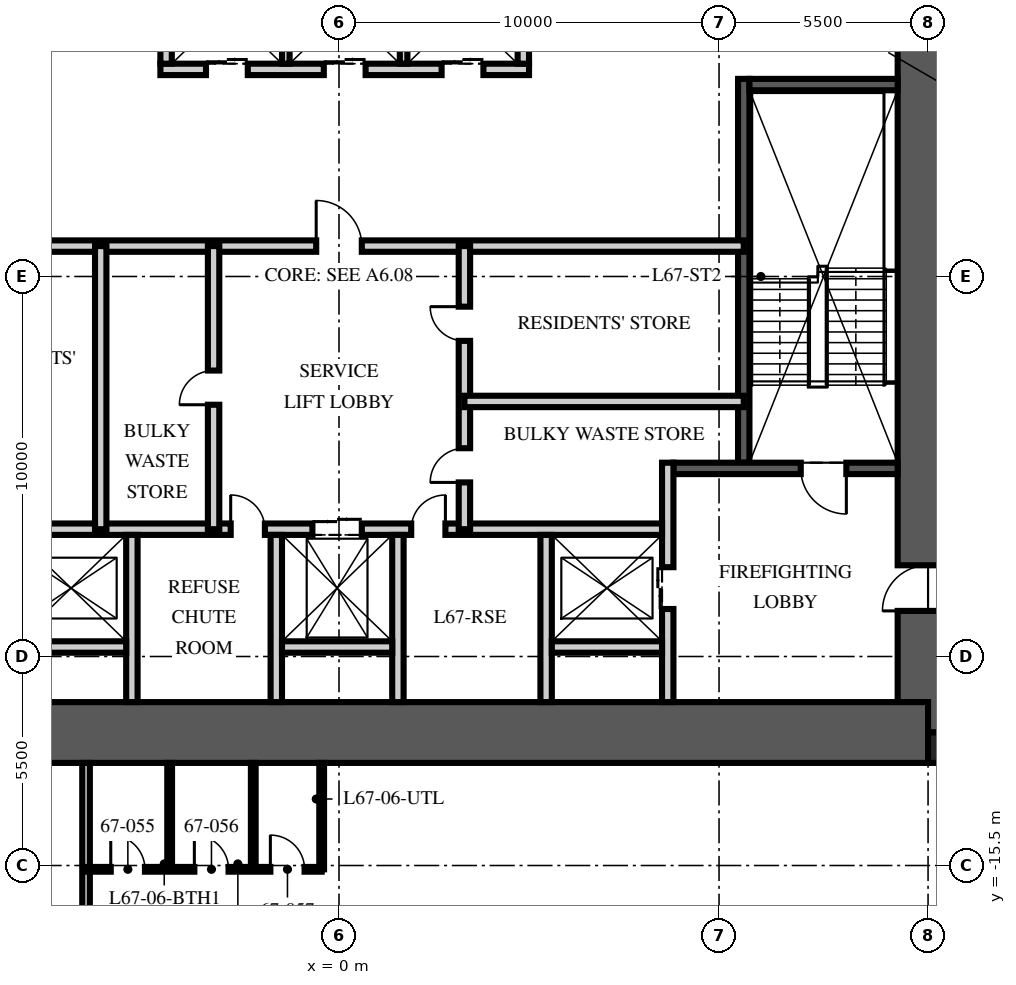
"""IFC4 building model, lengths in metres.
Left out: names, types, materials, properties, quantities, classifications, styles, units other than length and angle.
Written with IfcOpenShell. Run it as: python <this file> out.ifc"""

import sys

from ifc_helpers import new_model, si_unit, direction, frame, frame_2d, origin, origin_2d, place, context, subcontext, project, spatial, rectangle, extrude, element, fill, save


model = new_model("IFC4")
c1 = context("Model", 3, precision=1e-05, world=origin(), true_north=direction((0.0, 1.0)))
c2 = subcontext(c1, "Body", "Model", "MODEL_VIEW")
j1 = project(units=[si_unit("LENGTHUNIT", "METRE"), si_unit("PLANEANGLEUNIT", "RADIAN")], contexts=[c1])
p1 = place(None, origin())
s1 = spatial("IfcSite", under=j1, at=p1, CompositionType="ELEMENT")
p2 = place(p1, origin())
s2 = spatial("IfcBuilding", under=s1, at=p2, CompositionType="ELEMENT")
p3 = place(p2, frame((0.0, 0.0, 267.0)))
s3 = spatial("IfcBuildingStorey", under=s2, at=p3, CompositionType="ELEMENT", Elevation=267.0)
p4 = place(p3, frame((15.5, -12.0, -0.25), z_axis=(0.0, 0.0, 1.0), x_axis=(0.0, 1.0, 0.0)))
e1 = element("IfcWall", 1, at=p4, inside=s3, PredefinedType="SHEAR", context=c2, shape_type="SweptSolid", body=[
    extrude(rectangle(XDim=24.0, YDim=1.6, at=frame_2d((12.0, 0.0))), origin(), (0.0, 0.0, 1.0), 3.75),
])
p5 = place(p4, frame((3.2, 0.0, 0.25)))
e2 = element("IfcOpeningElement", 2, at=p5, cuts=e1, PredefinedType="OPENING", context=c2, shape_type="SweptSolid", body=[
    extrude(rectangle(XDim=1.2, YDim=2.1, at=frame_2d((0.6, 1.05))), frame((0.0, 0.81, 0.0), z_axis=(0.0, -1.0, 0.0), x_axis=(1.0, 0.0, 0.0)), (0.0, 0.0, 1.0), 1.62),
])
p6 = place(p4, frame((19.3, 0.0, 0.25)))
e3 = element("IfcOpeningElement", 3, at=p6, cuts=e1, PredefinedType="OPENING", context=c2, shape_type="SweptSolid", body=[
    extrude(rectangle(XDim=1.8, YDim=2.1, at=frame_2d((0.9, 1.05))), frame((0.0, 0.81, 0.0), z_axis=(0.0, -1.0, 0.0), x_axis=(1.0, 0.0, 0.0)), (0.0, 0.0, 1.0), 1.62),
])
p7 = place(p3, frame((-15.5, -12.0, -0.25), z_axis=(0.0, 0.0, 1.0), x_axis=(1.0, 0.0, 0.0)))
e4 = element("IfcWall", 4, at=p7, inside=s3, PredefinedType="SHEAR", context=c2, shape_type="SweptSolid", body=[
    extrude(rectangle(XDim=31.0, YDim=1.6, at=frame_2d((15.5, 0.0))), origin(), (0.0, 0.0, 1.0), 3.75),
])
p8 = place(p3, frame((15.9, -12.4, -0.25), z_axis=(0.0, 0.0, 1.0), x_axis=(1.0, 0.0, 0.0)))
e5 = element("IfcColumn", 5, at=p8, inside=s3, PredefinedType="COLUMN", context=c2, shape_type="SweptSolid", body=[
    extrude(rectangle(XDim=0.8, YDim=0.8, at=origin_2d()), origin(), (0.0, 0.0, 1.0), 3.75),
])
p9 = place(p3, frame((10.65, -4.9, 0.0), z_axis=(0.0, 0.0, 1.0), x_axis=(0.0, 1.0, 0.0)))
e6 = element("IfcWall", 6, at=p9, inside=s3, PredefinedType="SOLIDWALL", context=c2, shape_type="SweptSolid", body=[
    extrude(rectangle(XDim=10.1, YDim=0.3, at=frame_2d((5.05, 0.0))), origin(), (0.0, 0.0, 1.0), 3.5),
])
p10 = place(p3, frame((14.7, -5.05, 0.0), z_axis=(0.0, 0.0, 1.0), x_axis=(-1.0, 0.0, 0.0)))
e7 = element("IfcWall", 7, at=p10, inside=s3, PredefinedType="SOLIDWALL", context=c2, shape_type="SweptSolid", body=[
    extrude(rectangle(XDim=5.9, YDim=0.3, at=frame_2d((2.95, 0.0))), origin(), (0.0, 0.0, 1.0), 3.5),
])
p11 = place(p10, frame((1.35, 0.0, 0.0)))
e8 = element("IfcOpeningElement", 8, at=p11, cuts=e7, PredefinedType="OPENING", context=c2, shape_type="SweptSolid", body=[
    extrude(rectangle(XDim=1.2, YDim=2.1, at=frame_2d((0.6, 1.05))), frame((0.0, 0.16, 0.0), z_axis=(0.0, -1.0, 0.0), x_axis=(1.0, 0.0, 0.0)), (0.0, 0.0, 1.0), 0.32),
])
p12 = place(p3, frame((14.7, 5.05, 0.0), z_axis=(0.0, 0.0, 1.0), x_axis=(-1.0, 0.0, 0.0)))
e9 = element("IfcWall", 9, at=p12, inside=s3, PredefinedType="SOLIDWALL", context=c2, shape_type="SweptSolid", body=[
    extrude(rectangle(XDim=3.9, YDim=0.3, at=frame_2d((1.95, 0.0))), origin(), (0.0, 0.0, 1.0), 3.5),
])
p13 = place(p3, frame((8.65, -11.2, 0.0), z_axis=(0.0, 0.0, 1.0), x_axis=(0.0, 1.0, 0.0)))
e10 = element("IfcWall", 10, at=p13, inside=s3, PredefinedType="PARTITIONING", context=c2, shape_type="SweptSolid", body=[
    extrude(rectangle(XDim=6.3, YDim=0.3, at=frame_2d((3.15, 0.0))), origin(), (0.0, 0.0, 1.0), 3.5),
])
p14 = place(p13, frame((2.45, 0.0, 0.0)))
e11 = element("IfcOpeningElement", 11, at=p14, cuts=e10, PredefinedType="OPENING", context=c2, shape_type="SweptSolid", body=[
    extrude(rectangle(XDim=1.1, YDim=2.1, at=frame_2d((0.55, 1.05))), frame((0.0, 0.16, 0.0), z_axis=(0.0, -1.0, 0.0), x_axis=(1.0, 0.0, 0.0)), (0.0, 0.0, 1.0), 0.32),
])
p15 = place(p3, frame((-8.5, -6.65, 0.0), z_axis=(0.0, 0.0, 1.0), x_axis=(1.0, 0.0, 0.0)))
e12 = element("IfcWall", 12, at=p15, inside=s3, PredefinedType="PARTITIONING", context=c2, shape_type="SweptSolid", body=[
    extrude(rectangle(XDim=17.0, YDim=0.3, at=frame_2d((8.5, 0.0))), origin(), (0.0, 0.0, 1.0), 3.5),
])
p16 = place(p15, frame((7.8, 0.0, 0.0)))
e13 = element("IfcOpeningElement", 13, at=p16, cuts=e12, PredefinedType="OPENING", context=c2, shape_type="SweptSolid", body=[
    extrude(rectangle(XDim=1.3, YDim=2.4, at=frame_2d((0.65, 1.2))), frame((0.0, 0.16, 0.0), z_axis=(0.0, -1.0, 0.0), x_axis=(1.0, 0.0, 0.0)), (0.0, 0.0, 1.0), 0.32),
])
p17 = place(p15, frame((5.65, 0.0, 0.0)))
e14 = element("IfcOpeningElement", 14, at=p17, cuts=e12, PredefinedType="OPENING", context=c2, shape_type="SweptSolid", body=[
    extrude(rectangle(XDim=0.9, YDim=2.1, at=frame_2d((0.45, 1.05))), frame((0.0, 0.16, 0.0), z_axis=(0.0, -1.0, 0.0), x_axis=(1.0, 0.0, 0.0)), (0.0, 0.0, 1.0), 0.32),
])
p18 = place(p15, frame((10.4, 0.0, 0.0)))
e15 = element("IfcOpeningElement", 15, at=p18, cuts=e12, PredefinedType="OPENING", context=c2, shape_type="SweptSolid", body=[
    extrude(rectangle(XDim=0.9, YDim=2.1, at=frame_2d((0.45, 1.05))), frame((0.0, 0.16, 0.0), z_axis=(0.0, -1.0, 0.0), x_axis=(1.0, 0.0, 0.0)), (0.0, 0.0, 1.0), 0.32),
])
for number, where, z_axis, x_axis in (
    (16, (-5.45, -11.2, 0.0), (0.0, 0.0, 1.0), (0.0, 1.0, 0.0)),
    (17, (-1.65, -11.2, 0.0), (0.0, 0.0, 1.0), (0.0, 1.0, 0.0)),
    (18, (1.55, -11.2, 0.0), (0.0, 0.0, 1.0), (0.0, 1.0, 0.0)),
    (19, (5.45, -11.2, 0.0), (0.0, 0.0, 1.0), (0.0, 1.0, 0.0)),
):
    element("IfcWall", number, at=place(p3, frame(where, z_axis=z_axis, x_axis=x_axis)), inside=s3, PredefinedType="PARTITIONING", context=c2, shape_type="SweptSolid", body=[
        extrude(rectangle(XDim=4.4, YDim=0.3, at=frame_2d((2.2, 0.0))), origin(), (0.0, 0.0, 1.0), 3.5),
    ])
for number, where, z_axis, x_axis in (
    (20, (-8.5, -9.75, 0.0), (0.0, 0.0, 1.0), (1.0, 0.0, 0.0)),
    (21, (-1.5, -9.75, 0.0), (0.0, 0.0, 1.0), (1.0, 0.0, 0.0)),
    (22, (5.6, -9.75, 0.0), (0.0, 0.0, 1.0), (1.0, 0.0, 0.0)),
):
    element("IfcWall", number, at=place(p3, frame(where, z_axis=z_axis, x_axis=x_axis)), inside=s3, PredefinedType="PARTITIONING", context=c2, shape_type="SweptSolid", body=[
        extrude(rectangle(XDim=2.9, YDim=0.3, at=frame_2d((1.45, 0.0))), origin(), (0.0, 0.0, 1.0), 3.5),
    ])
p19 = place(p3, frame((-4.7, 5.45, 0.0), z_axis=(0.0, 0.0, 1.0), x_axis=(1.0, 0.0, 0.0)))
e23 = element("IfcWall", 23, at=p19, inside=s3, PredefinedType="PARTITIONING", context=c2, shape_type="SweptSolid", body=[
    extrude(rectangle(XDim=9.7, YDim=0.3, at=frame_2d((4.85, 0.0))), origin(), (0.0, 0.0, 1.0), 3.5),
])
p20 = place(p19, frame((1.2, 0.0, 0.0)))
e24 = element("IfcOpeningElement", 24, at=p20, cuts=e23, PredefinedType="OPENING", context=c2, shape_type="SweptSolid", body=[
    extrude(rectangle(XDim=1.1, YDim=2.1, at=frame_2d((0.55, 1.05))), frame((0.0, 0.16, 0.0), z_axis=(0.0, -1.0, 0.0), x_axis=(1.0, 0.0, 0.0)), (0.0, 0.0, 1.0), 0.32),
])
p21 = place(p19, frame((4.3, 0.0, 0.0)))
e25 = element("IfcOpeningElement", 25, at=p21, cuts=e23, PredefinedType="OPENING", context=c2, shape_type="SweptSolid", body=[
    extrude(rectangle(XDim=1.1, YDim=2.1, at=frame_2d((0.55, 1.05))), frame((0.0, 0.16, 0.0), z_axis=(0.0, -1.0, 0.0), x_axis=(1.0, 0.0, 0.0)), (0.0, 0.0, 1.0), 0.32),
])
p22 = place(p19, frame((7.4, 0.0, 0.0)))
e26 = element("IfcOpeningElement", 26, at=p22, cuts=e23, PredefinedType="OPENING", context=c2, shape_type="SweptSolid", body=[
    extrude(rectangle(XDim=1.1, YDim=2.1, at=frame_2d((0.55, 1.05))), frame((0.0, 0.16, 0.0), z_axis=(0.0, -1.0, 0.0), x_axis=(1.0, 0.0, 0.0)), (0.0, 0.0, 1.0), 0.32),
])
for number, where, z_axis, x_axis in (
    (27, (-4.55, 5.6, 0.0), (0.0, 0.0, 1.0), (0.0, 1.0, 0.0)),
    (28, (4.85, 5.6, 0.0), (0.0, 0.0, 1.0), (0.0, 1.0, 0.0)),
):
    element("IfcWall", number, at=place(p3, frame(where, z_axis=z_axis, x_axis=x_axis)), inside=s3, PredefinedType="PARTITIONING", context=c2, shape_type="SweptSolid", body=[
        extrude(rectangle(XDim=2.8, YDim=0.3, at=frame_2d((1.4, 0.0))), origin(), (0.0, 0.0, 1.0), 3.5),
    ])
for number, where, z_axis, x_axis in (
    (29, (-1.4, 5.6, 0.0), (0.0, 0.0, 1.0), (0.0, 1.0, 0.0)),
    (30, (1.7, 5.6, 0.0), (0.0, 0.0, 1.0), (0.0, 1.0, 0.0)),
):
    element("IfcWall", number, at=place(p3, frame(where, z_axis=z_axis, x_axis=x_axis)), inside=s3, PredefinedType="PARTITIONING", context=c2, shape_type="SweptSolid", body=[
        extrude(rectangle(XDim=2.8, YDim=0.2, at=frame_2d((1.4, 0.0))), origin(), (0.0, 0.0, 1.0), 3.5),
    ])
p23 = place(p3, frame((-10.65, 0.8, 0.0), z_axis=(0.0, 0.0, 1.0), x_axis=(1.0, 0.0, 0.0)))
e31 = element("IfcWall", 31, at=p23, inside=s3, PredefinedType="PARTITIONING", context=c2, shape_type="SweptSolid", body=[
    extrude(rectangle(XDim=21.3, YDim=0.3, at=frame_2d((10.65, 0.0))), origin(), (0.0, 0.0, 1.0), 3.5),
])
p24 = place(p23, frame((10.05, 0.0, 0.0)))
e32 = element("IfcOpeningElement", 32, at=p24, cuts=e31, PredefinedType="OPENING", context=c2, shape_type="SweptSolid", body=[
    extrude(rectangle(XDim=1.2, YDim=2.1, at=frame_2d((0.6, 1.05))), frame((0.0, 0.16, 0.0), z_axis=(0.0, -1.0, 0.0), x_axis=(1.0, 0.0, 0.0)), (0.0, 0.0, 1.0), 0.32),
])
p25 = place(p23, frame((1.74, 0.0, 0.0)))
e33 = element("IfcOpeningElement", 33, at=p25, cuts=e31, PredefinedType="OPENING", context=c2, shape_type="SweptSolid", body=[
    extrude(rectangle(XDim=0.9, YDim=2.1, at=frame_2d((0.45, 1.05))), frame((0.0, 0.16, 0.0), z_axis=(0.0, -1.0, 0.0), x_axis=(1.0, 0.0, 0.0)), (0.0, 0.0, 1.0), 0.32),
])
p26 = place(p3, frame((-3.3, -6.65, 0.0), z_axis=(0.0, 0.0, 1.0), x_axis=(0.0, 1.0, 0.0)))
e34 = element("IfcWall", 34, at=p26, inside=s3, PredefinedType="PARTITIONING", context=c2, shape_type="SweptSolid", body=[
    extrude(rectangle(XDim=7.45, YDim=0.3, at=frame_2d((3.725, 0.0))), origin(), (0.0, 0.0, 1.0), 3.5),
])
p27 = place(p26, frame((3.275, 0.0, 0.0)))
e35 = element("IfcOpeningElement", 35, at=p27, cuts=e34, PredefinedType="OPENING", context=c2, shape_type="SweptSolid", body=[
    extrude(rectangle(XDim=0.9, YDim=2.1, at=frame_2d((0.45, 1.05))), frame((0.0, 0.16, 0.0), z_axis=(0.0, -1.0, 0.0), x_axis=(1.0, 0.0, 0.0)), (0.0, 0.0, 1.0), 0.32),
])
p28 = place(p3, frame((3.3, -6.65, 0.0), z_axis=(0.0, 0.0, 1.0), x_axis=(0.0, 1.0, 0.0)))
e36 = element("IfcWall", 36, at=p28, inside=s3, PredefinedType="PARTITIONING", context=c2, shape_type="SweptSolid", body=[
    extrude(rectangle(XDim=7.45, YDim=0.3, at=frame_2d((3.725, 0.0))), origin(), (0.0, 0.0, 1.0), 3.5),
])
p29 = place(p28, frame((1.231, 0.0, 0.0)))
e37 = element("IfcOpeningElement", 37, at=p29, cuts=e36, PredefinedType="OPENING", context=c2, shape_type="SweptSolid", body=[
    extrude(rectangle(XDim=0.9, YDim=2.1, at=frame_2d((0.45, 1.05))), frame((0.0, 0.16, 0.0), z_axis=(0.0, -1.0, 0.0), x_axis=(1.0, 0.0, 0.0)), (0.0, 0.0, 1.0), 0.32),
])
p30 = place(p28, frame((4.956, 0.0, 0.0)))
e38 = element("IfcOpeningElement", 38, at=p30, cuts=e36, PredefinedType="OPENING", context=c2, shape_type="SweptSolid", body=[
    extrude(rectangle(XDim=0.9, YDim=2.1, at=frame_2d((0.45, 1.05))), frame((0.0, 0.16, 0.0), z_axis=(0.0, -1.0, 0.0), x_axis=(1.0, 0.0, 0.0)), (0.0, 0.0, 1.0), 0.32),
])
p31 = place(p3, frame((-6.27, -6.65, 0.0), z_axis=(0.0, 0.0, 1.0), x_axis=(0.0, 1.0, 0.0)))
e39 = element("IfcWall", 39, at=p31, inside=s3, PredefinedType="PARTITIONING", context=c2, shape_type="SweptSolid", body=[
    extrude(rectangle(XDim=7.45, YDim=0.3, at=frame_2d((3.725, 0.0))), origin(), (0.0, 0.0, 1.0), 3.5),
])
p32 = place(p3, frame((10.65, -3.288, 0.0), z_axis=(0.0, 0.0, 1.0), x_axis=(-1.0, 0.0, 0.0)))
e40 = element("IfcWall", 40, at=p32, inside=s3, PredefinedType="PARTITIONING", context=c2, shape_type="SweptSolid", body=[
    extrude(rectangle(XDim=7.35, YDim=0.3, at=frame_2d((3.675, 0.0))), origin(), (0.0, 0.0, 1.0), 3.5),
])
p33 = place(p3, frame((-6.656, -12.8, 0.0), z_axis=(0.0, 0.0, 1.0), x_axis=(0.0, -1.0, 0.0)))
e41 = element("IfcWall", 41, at=p33, inside=s3, PredefinedType="PARTITIONING", context=c2, shape_type="SweptSolid", body=[
    extrude(rectangle(XDim=12.65, YDim=0.2, at=frame_2d((6.325, 0.0))), origin(), (0.0, 0.0, 1.0), 2.91),
])
p34 = place(p3, frame((-6.656, -15.6, 0.0), z_axis=(0.0, 0.0, 1.0), x_axis=(1.0, 0.0, 0.0)))
e42 = element("IfcWall", 42, at=p34, inside=s3, PredefinedType="PARTITIONING", context=c2, shape_type="SweptSolid", body=[
    extrude(rectangle(XDim=6.2, YDim=0.125, at=frame_2d((3.1, 0.0))), origin(), (0.0, 0.0, 1.0), 2.81),
])
p35 = place(p34, frame((0.65, 0.0, 0.0)))
e43 = element("IfcOpeningElement", 43, at=p35, cuts=e42, PredefinedType="OPENING", context=c2, shape_type="SweptSolid", body=[
    extrude(rectangle(XDim=0.9, YDim=2.1, at=frame_2d((0.45, 1.05))), frame((0.0, 0.073, 0.0), z_axis=(0.0, -1.0, 0.0), x_axis=(1.0, 0.0, 0.0)), (0.0, 0.0, 1.0), 0.145),
])
p36 = place(p34, frame((2.85, 0.0, 0.0)))
e44 = element("IfcOpeningElement", 44, at=p36, cuts=e42, PredefinedType="OPENING", context=c2, shape_type="SweptSolid", body=[
    extrude(rectangle(XDim=0.9, YDim=2.1, at=frame_2d((0.45, 1.05))), frame((0.0, 0.073, 0.0), z_axis=(0.0, -1.0, 0.0), x_axis=(1.0, 0.0, 0.0)), (0.0, 0.0, 1.0), 0.145),
])
p37 = place(p34, frame((4.85, 0.0, 0.0)))
e45 = element("IfcOpeningElement", 45, at=p37, cuts=e42, PredefinedType="OPENING", context=c2, shape_type="SweptSolid", body=[
    extrude(rectangle(XDim=0.9, YDim=2.1, at=frame_2d((0.45, 1.05))), frame((0.0, 0.073, 0.0), z_axis=(0.0, -1.0, 0.0), x_axis=(1.0, 0.0, 0.0)), (0.0, 0.0, 1.0), 0.145),
])
for number, where, z_axis, x_axis in (
    (46, (-4.456, -12.8, 0.0), (0.0, 0.0, 1.0), (0.0, -1.0, 0.0)),
    (47, (-2.256, -12.8, 0.0), (0.0, 0.0, 1.0), (0.0, -1.0, 0.0)),
    (48, (-0.456, -12.8, 0.0), (0.0, 0.0, 1.0), (0.0, -1.0, 0.0)),
):
    element("IfcWall", number, at=place(p3, frame(where, z_axis=z_axis, x_axis=x_axis)), inside=s3, PredefinedType="PARTITIONING", context=c2, shape_type="SweptSolid", body=[
        extrude(rectangle(XDim=2.8, YDim=0.125, at=frame_2d((1.4, 0.0))), origin(), (0.0, 0.0, 1.0), 3.5),
    ])
p38 = place(p11, origin())
e49 = element("IfcDoor", 49, at=p38, inside=s3, OperationType="SINGLE_SWING_LEFT", PredefinedType="DOOR", context=c2, shape_type="SweptSolid", body=[
    extrude(rectangle(XDim=1.2, YDim=2.1, at=frame_2d((0.6, 1.05))), frame((0.0, 0.025, 0.0), z_axis=(0.0, -1.0, 0.0), x_axis=(1.0, 0.0, 0.0)), (0.0, 0.0, 1.0), 0.05),
])
fill(e8, e49)
p39 = place(p5, origin())
e50 = element("IfcDoor", 50, at=p39, inside=s3, OperationType="SINGLE_SWING_LEFT", PredefinedType="DOOR", context=c2, shape_type="SweptSolid", body=[
    extrude(rectangle(XDim=1.2, YDim=2.1, at=frame_2d((0.6, 1.05))), frame((0.0, 0.025, 0.0), z_axis=(0.0, -1.0, 0.0), x_axis=(1.0, 0.0, 0.0)), (0.0, 0.0, 1.0), 0.05),
])
fill(e2, e50)
p40 = place(p14, origin())
e51 = element("IfcDoor", 51, at=p40, inside=s3, OperationType="DOUBLE_DOOR_SLIDING", PredefinedType="DOOR", context=c2, shape_type="SweptSolid", body=[
    extrude(rectangle(XDim=1.1, YDim=2.1, at=frame_2d((0.55, 1.05))), frame((0.0, 0.025, 0.0), z_axis=(0.0, -1.0, 0.0), x_axis=(1.0, 0.0, 0.0)), (0.0, 0.0, 1.0), 0.05),
])
fill(e11, e51)
p41 = place(p20, origin())
e52 = element("IfcDoor", 52, at=p41, inside=s3, OperationType="DOUBLE_DOOR_SLIDING", PredefinedType="DOOR", context=c2, shape_type="SweptSolid", body=[
    extrude(rectangle(XDim=1.1, YDim=2.1, at=frame_2d((0.55, 1.05))), frame((0.0, 0.025, 0.0), z_axis=(0.0, -1.0, 0.0), x_axis=(1.0, 0.0, 0.0)), (0.0, 0.0, 1.0), 0.05),
])
fill(e24, e52)
p42 = place(p21, origin())
e53 = element("IfcDoor", 53, at=p42, inside=s3, OperationType="DOUBLE_DOOR_SLIDING", PredefinedType="DOOR", context=c2, shape_type="SweptSolid", body=[
    extrude(rectangle(XDim=1.1, YDim=2.1, at=frame_2d((0.55, 1.05))), frame((0.0, 0.025, 0.0), z_axis=(0.0, -1.0, 0.0), x_axis=(1.0, 0.0, 0.0)), (0.0, 0.0, 1.0), 0.05),
])
fill(e25, e53)
p43 = place(p22, origin())
e54 = element("IfcDoor", 54, at=p43, inside=s3, OperationType="DOUBLE_DOOR_SLIDING", PredefinedType="DOOR", context=c2, shape_type="SweptSolid", body=[
    extrude(rectangle(XDim=1.1, YDim=2.1, at=frame_2d((0.55, 1.05))), frame((0.0, 0.025, 0.0), z_axis=(0.0, -1.0, 0.0), x_axis=(1.0, 0.0, 0.0)), (0.0, 0.0, 1.0), 0.05),
])
fill(e26, e54)
p44 = place(p16, origin())
e55 = element("IfcDoor", 55, at=p44, inside=s3, OperationType="DOUBLE_DOOR_SLIDING", PredefinedType="DOOR", context=c2, shape_type="SweptSolid", body=[
    extrude(rectangle(XDim=1.3, YDim=2.4, at=frame_2d((0.65, 1.2))), frame((0.0, 0.025, 0.0), z_axis=(0.0, -1.0, 0.0), x_axis=(1.0, 0.0, 0.0)), (0.0, 0.0, 1.0), 0.05),
])
fill(e13, e55)
p45 = place(p24, origin())
e56 = element("IfcDoor", 56, at=p45, inside=s3, OperationType="SINGLE_SWING_LEFT", PredefinedType="DOOR", context=c2, shape_type="SweptSolid", body=[
    extrude(rectangle(XDim=1.2, YDim=2.1, at=frame_2d((0.6, 1.05))), frame((0.0, 0.025, 0.0), z_axis=(0.0, -1.0, 0.0), x_axis=(1.0, 0.0, 0.0)), (0.0, 0.0, 1.0), 0.05),
])
fill(e32, e56)
p46 = place(p17, origin())
e57 = element("IfcDoor", 57, at=p46, inside=s3, OperationType="SINGLE_SWING_LEFT", PredefinedType="DOOR", context=c2, shape_type="SweptSolid", body=[
    extrude(rectangle(XDim=0.9, YDim=2.1, at=frame_2d((0.45, 1.05))), frame((0.0, 0.025, 0.0), z_axis=(0.0, -1.0, 0.0), x_axis=(1.0, 0.0, 0.0)), (0.0, 0.0, 1.0), 0.05),
])
fill(e14, e57)
p47 = place(p18, origin())
e58 = element("IfcDoor", 58, at=p47, inside=s3, OperationType="SINGLE_SWING_RIGHT", PredefinedType="DOOR", context=c2, shape_type="SweptSolid", body=[
    extrude(rectangle(XDim=0.9, YDim=2.1, at=frame_2d((0.45, 1.05))), frame((0.0, 0.025, 0.0), z_axis=(0.0, -1.0, 0.0), x_axis=(1.0, 0.0, 0.0)), (0.0, 0.0, 1.0), 0.05),
])
fill(e15, e58)
p48 = place(p27, origin())
e59 = element("IfcDoor", 59, at=p48, inside=s3, OperationType="SINGLE_SWING_LEFT", PredefinedType="DOOR", context=c2, shape_type="SweptSolid", body=[
    extrude(rectangle(XDim=0.9, YDim=2.1, at=frame_2d((0.45, 1.05))), frame((0.0, 0.025, 0.0), z_axis=(0.0, -1.0, 0.0), x_axis=(1.0, 0.0, 0.0)), (0.0, 0.0, 1.0), 0.05),
])
fill(e35, e59)
p49 = place(p29, origin())
e60 = element("IfcDoor", 60, at=p49, inside=s3, OperationType="SINGLE_SWING_LEFT", PredefinedType="DOOR", context=c2, shape_type="SweptSolid", body=[
    extrude(rectangle(XDim=0.9, YDim=2.1, at=frame_2d((0.45, 1.05))), frame((0.0, 0.025, 0.0), z_axis=(0.0, -1.0, 0.0), x_axis=(1.0, 0.0, 0.0)), (0.0, 0.0, 1.0), 0.05),
])
fill(e37, e60)
p50 = place(p30, origin())
e61 = element("IfcDoor", 61, at=p50, inside=s3, OperationType="SINGLE_SWING_RIGHT", PredefinedType="DOOR", context=c2, shape_type="SweptSolid", body=[
    extrude(rectangle(XDim=0.9, YDim=2.1, at=frame_2d((0.45, 1.05))), frame((0.0, 0.025, 0.0), z_axis=(0.0, -1.0, 0.0), x_axis=(1.0, 0.0, 0.0)), (0.0, 0.0, 1.0), 0.05),
])
fill(e38, e61)
p51 = place(p35, origin())
e62 = element("IfcDoor", 62, at=p51, inside=s3, OperationType="SINGLE_SWING_LEFT", PredefinedType="DOOR", context=c2, shape_type="SweptSolid", body=[
    extrude(rectangle(XDim=0.9, YDim=2.1, at=frame_2d((0.45, 1.05))), frame((0.0, 0.025, 0.0), z_axis=(0.0, -1.0, 0.0), x_axis=(1.0, 0.0, 0.0)), (0.0, 0.0, 1.0), 0.05),
])
fill(e43, e62)
p52 = place(p36, origin())
e63 = element("IfcDoor", 63, at=p52, inside=s3, OperationType="SINGLE_SWING_LEFT", PredefinedType="DOOR", context=c2, shape_type="SweptSolid", body=[
    extrude(rectangle(XDim=0.9, YDim=2.1, at=frame_2d((0.45, 1.05))), frame((0.0, 0.025, 0.0), z_axis=(0.0, -1.0, 0.0), x_axis=(1.0, 0.0, 0.0)), (0.0, 0.0, 1.0), 0.05),
])
fill(e44, e63)
p53 = place(p37, origin())
e64 = element("IfcDoor", 64, at=p53, inside=s3, OperationType="SINGLE_SWING_LEFT", PredefinedType="DOOR", context=c2, shape_type="SweptSolid", body=[
    extrude(rectangle(XDim=0.9, YDim=2.1, at=frame_2d((0.45, 1.05))), frame((0.0, 0.025, 0.0), z_axis=(0.0, -1.0, 0.0), x_axis=(1.0, 0.0, 0.0)), (0.0, 0.0, 1.0), 0.05),
])
fill(e45, e64)
save(model, sys.argv[1])
